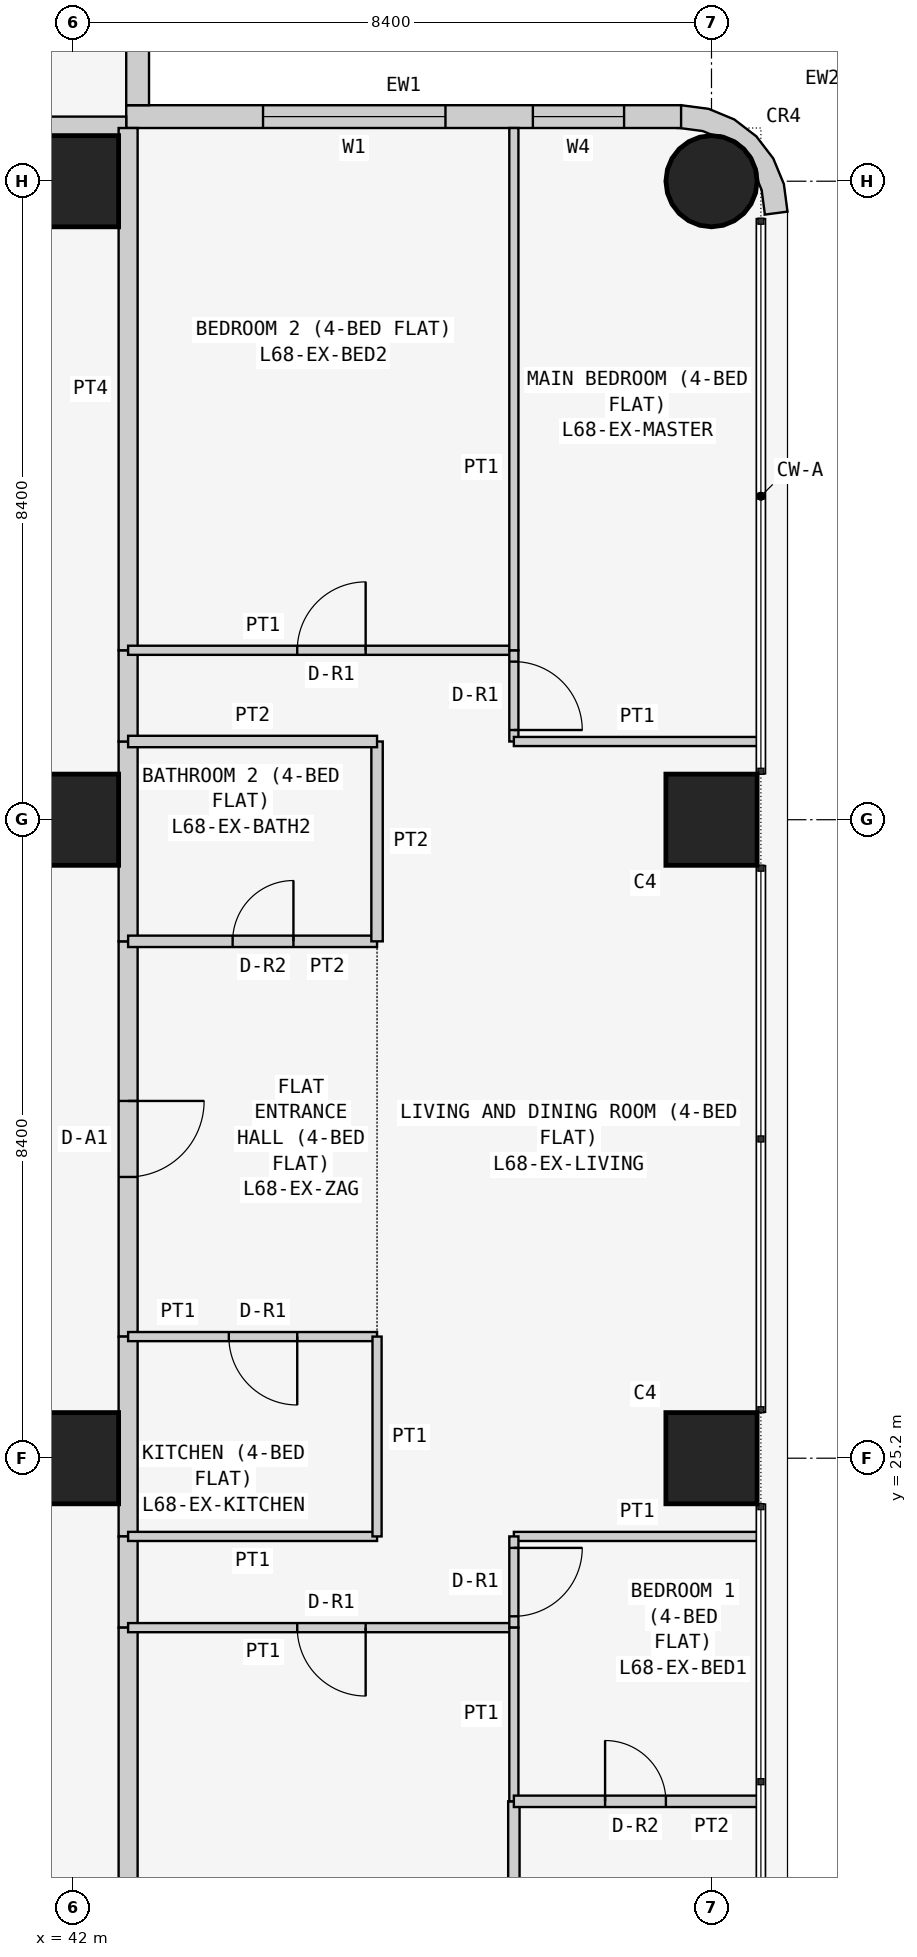
"""IFC4 building model, lengths in metres.
Left out: names, types, materials, properties, quantities, classifications, styles, units other than length and angle.
Written with IfcOpenShell. Run it as: python <this file> out.ifc"""

import sys

from ifc_helpers import new_model, si_unit, direction, frame, frame_2d, origin, origin_2d, place, context, subcontext, project, spatial, polyline, rectangle, circle, outline, extrude, element, fill, save


model = new_model("IFC4")
c1 = context("Model", 3, precision=1e-05, world=origin(), true_north=direction((0.0, 1.0)))
c2 = subcontext(c1, "Body", "Model", "MODEL_VIEW")
j1 = project(units=[si_unit("LENGTHUNIT", "METRE"), si_unit("PLANEANGLEUNIT", "RADIAN")], contexts=[c1])
p1 = place(None, origin())
s1 = spatial("IfcSite", under=j1, at=p1, CompositionType="ELEMENT")
p2 = place(p1, origin())
s2 = spatial("IfcBuilding", under=s1, at=p2, CompositionType="ELEMENT")
p3 = place(p2, frame((0.0, 0.0, 261.3)))
s3 = spatial("IfcBuildingStorey", under=s2, at=p3, CompositionType="ELEMENT", Elevation=261.3)
for number, where, z_axis, x_axis in (
    (1, (42.0, 25.2, 0.0), (0.0, 0.0, 1.0), (1.0, 0.0, 0.0)),
    (2, (42.0, 33.6, 0.0), (0.0, 0.0, 1.0), (1.0, 0.0, 0.0)),
    (3, (42.0, 42.0, 0.0), (0.0, 0.0, 1.0), (1.0, 0.0, 0.0)),
    (4, (50.4, 25.2, 0.0), (0.0, 0.0, 1.0), (1.0, 0.0, 0.0)),
    (5, (50.4, 33.6, 0.0), (0.0, 0.0, 1.0), (1.0, 0.0, 0.0)),
):
    element("IfcColumn", number, at=place(p3, frame(where, z_axis=z_axis, x_axis=x_axis)), inside=s3, PredefinedType="COLUMN", context=c2, shape_type="SweptSolid", body=[
        extrude(rectangle(XDim=1.2, YDim=1.2, at=origin_2d()), origin(), (0.0, 0.0, 1.0), 3.6),
    ])
p4 = place(p3, frame((50.4, 42.0, 0.0), z_axis=(0.0, 0.0, 1.0), x_axis=(1.0, 0.0, 0.0)))
e6 = element("IfcColumn", 6, at=p4, inside=s3, PredefinedType="COLUMN", context=c2, shape_type="SweptSolid", body=[
    extrude(circle(Radius=0.6, at=origin_2d()), origin(), (0.0, 0.0, 1.0), 3.6),
])
p5 = place(p3, frame((50.0, 42.85, 0.0), z_axis=(0.0, 0.0, 1.0), x_axis=(-1.0, 0.0, 0.0)))
e7 = element("IfcWall", 7, at=p5, inside=s3, PredefinedType="SOLIDWALL", context=c2, shape_type="SweptSolid", body=[
    extrude(rectangle(XDim=7.3, YDim=0.3, at=frame_2d((3.65, 0.0))), origin(), (0.0, 0.0, 1.0), 3.45),
])
p6 = place(p5, frame((3.1, 0.0, 0.9)))
e8 = element("IfcOpeningElement", 8, at=p6, cuts=e7, PredefinedType="OPENING", context=c2, shape_type="SweptSolid", body=[
    extrude(rectangle(XDim=2.4, YDim=1.5, at=frame_2d((1.2, 0.75))), frame((0.0, 0.16, 0.0), z_axis=(0.0, -1.0, 0.0), x_axis=(1.0, 0.0, 0.0)), (0.0, 0.0, 1.0), 0.32),
])
p7 = place(p5, frame((0.75, 0.0, 0.9)))
e9 = element("IfcOpeningElement", 9, at=p7, cuts=e7, PredefinedType="OPENING", context=c2, shape_type="SweptSolid", body=[
    extrude(rectangle(XDim=1.2, YDim=1.5, at=frame_2d((0.6, 0.75))), frame((0.0, 0.16, 0.0), z_axis=(0.0, -1.0, 0.0), x_axis=(1.0, 0.0, 0.0)), (0.0, 0.0, 1.0), 0.32),
])
p8 = place(p3, frame((42.85, 43.0, 0.0), z_axis=(0.0, 0.0, 1.0), x_axis=(0.0, 1.0, 0.0)))
e10 = element("IfcWall", 10, at=p8, inside=s3, PredefinedType="SOLIDWALL", context=c2, shape_type="SweptSolid", body=[
    extrude(rectangle(XDim=7.0, YDim=0.3, at=frame_2d((3.5, 0.0))), origin(), (0.0, 0.0, 1.0), 3.45),
])
p9 = place(p8, frame((1.5, 0.0, 0.9)))
e11 = element("IfcOpeningElement", 11, at=p9, cuts=e10, PredefinedType="OPENING", context=c2, shape_type="SweptSolid", body=[
    extrude(rectangle(XDim=2.4, YDim=1.5, at=frame_2d((1.2, 0.75))), frame((0.0, 0.16, 0.0), z_axis=(0.0, -1.0, 0.0), x_axis=(1.0, 0.0, 0.0)), (0.0, 0.0, 1.0), 0.32),
])
p10 = place(p8, frame((5.05, 0.0, 0.9)))
e12 = element("IfcOpeningElement", 12, at=p10, cuts=e10, PredefinedType="OPENING", context=c2, shape_type="SweptSolid", body=[
    extrude(rectangle(XDim=1.2, YDim=1.5, at=frame_2d((0.6, 0.75))), frame((0.0, 0.16, 0.0), z_axis=(0.0, -1.0, 0.0), x_axis=(1.0, 0.0, 0.0)), (0.0, 0.0, 1.0), 0.32),
])
p11 = place(p3, frame((50.976, 41.638, 0.0), z_axis=(0.0, 0.0, 1.0), x_axis=(0.707106781187, 0.707106781187, 0.0)))
e13 = element("IfcWall", 13, at=p11, inside=s3, PredefinedType="SOLIDWALL", context=c2, shape_type="SweptSolid", body=[
    extrude(outline(polyline([(0.233, 0.114), (0.047, -0.129), (0.033, -0.143), (0.273, -0.327), (0.495, -0.037), (0.635, 0.301), (0.683, 0.663), (0.635, 1.025), (0.495, 1.363), (0.273, 1.653), (0.033, 1.469), (0.047, 1.455), (0.233, 1.212), (0.292, 1.069), (0.358, 1.003), (0.449, 0.782), (0.449, 0.543), (0.358, 0.322), (0.292, 0.257), (0.233, 0.114)])), origin(), (0.0, 0.0, 1.0), 3.45),
])
p12 = place(p3, frame((35.829, 42.725, 0.0), z_axis=(0.0, 0.0, 1.0), x_axis=(1.0, 0.0, 0.0)))
e14 = element("IfcWall", 14, at=p12, inside=s3, PredefinedType="PARTITIONING", context=c2, shape_type="SweptSolid", body=[
    extrude(rectangle(XDim=6.871, YDim=0.25, at=frame_2d((3.436, 0.0))), origin(), (0.0, 0.0, 1.0), 3.45),
])
p13 = place(p3, frame((42.725, 32.0, 0.0), z_axis=(0.0, 0.0, 1.0), x_axis=(0.0, -1.0, 0.0)))
e15 = element("IfcWall", 15, at=p13, inside=s3, PredefinedType="PARTITIONING", context=c2, shape_type="SweptSolid", body=[
    extrude(rectangle(XDim=5.2, YDim=0.25, at=frame_2d((2.6, 0.0))), origin(), (0.0, 0.0, 1.0), 3.45),
])
p14 = place(p13, frame((2.1, 0.0, 0.0)))
e16 = element("IfcOpeningElement", 16, at=p14, cuts=e15, PredefinedType="OPENING", context=c2, shape_type="SweptSolid", body=[
    extrude(rectangle(XDim=1.0, YDim=2.1, at=frame_2d((0.5, 1.05))), frame((0.0, 0.135, 0.0), z_axis=(0.0, -1.0, 0.0), x_axis=(1.0, 0.0, 0.0)), (0.0, 0.0, 1.0), 0.27),
])
p15 = place(p3, frame((42.725, 34.629, 0.0), z_axis=(0.0, 0.0, 1.0), x_axis=(0.0, -1.0, 0.0)))
e17 = element("IfcWall", 17, at=p15, inside=s3, PredefinedType="PARTITIONING", context=c2, shape_type="SweptSolid", body=[
    extrude(rectangle(XDim=2.629, YDim=0.25, at=frame_2d((1.314, 0.0))), origin(), (0.0, 0.0, 1.0), 3.45),
])
p16 = place(p3, frame((42.725, 26.8, 0.0), z_axis=(0.0, 0.0, 1.0), x_axis=(0.0, -1.0, 0.0)))
e18 = element("IfcWall", 18, at=p16, inside=s3, PredefinedType="PARTITIONING", context=c2, shape_type="SweptSolid", body=[
    extrude(rectangle(XDim=2.629, YDim=0.25, at=frame_2d((1.314, 0.0))), origin(), (0.0, 0.0, 1.0), 3.45),
])
p17 = place(p3, frame((42.725, 24.171, 0.0), z_axis=(0.0, 0.0, 1.0), x_axis=(0.0, -1.0, 0.0)))
e19 = element("IfcWall", 19, at=p17, inside=s3, PredefinedType="PARTITIONING", context=c2, shape_type="SweptSolid", body=[
    extrude(rectangle(XDim=1.2, YDim=0.25, at=frame_2d((0.6, 0.0))), origin(), (0.0, 0.0, 1.0), 3.45),
])
p18 = place(p3, frame((42.725, 35.829, 0.0), z_axis=(0.0, 0.0, 1.0), x_axis=(0.0, -1.0, 0.0)))
e20 = element("IfcWall", 20, at=p18, inside=s3, PredefinedType="PARTITIONING", context=c2, shape_type="SweptSolid", body=[
    extrude(rectangle(XDim=1.2, YDim=0.25, at=frame_2d((0.6, 0.0))), origin(), (0.0, 0.0, 1.0), 3.45),
])
for number, where, z_axis, x_axis in (
    (21, (42.725, 42.7, 0.0), (0.0, 0.0, 1.0), (0.0, -1.0, 0.0)),
    (22, (42.725, 22.971, 0.0), (0.0, 0.0, 1.0), (0.0, -1.0, 0.0)),
):
    element("IfcWall", number, at=place(p3, frame(where, z_axis=z_axis, x_axis=x_axis)), inside=s3, PredefinedType="PARTITIONING", context=c2, shape_type="SweptSolid", body=[
        extrude(rectangle(XDim=6.871, YDim=0.25, at=frame_2d((3.436, 0.0))), origin(), (0.0, 0.0, 1.0), 3.45),
    ])
p19 = place(p3, frame((46.0, 32.0, 0.0), z_axis=(0.0, 0.0, 1.0), x_axis=(-1.0, 0.0, 0.0)))
e23 = element("IfcWall", 23, at=p19, inside=s3, PredefinedType="PARTITIONING", context=c2, shape_type="SweptSolid", body=[
    extrude(rectangle(XDim=3.275, YDim=0.15, at=frame_2d((1.637, 0.0))), origin(), (0.0, 0.0, 1.0), 3.45),
])
p20 = place(p19, frame((1.1, 0.0, 0.0)))
e24 = element("IfcOpeningElement", 24, at=p20, cuts=e23, PredefinedType="OPENING", context=c2, shape_type="SweptSolid", body=[
    extrude(rectangle(XDim=0.8, YDim=2.1, at=frame_2d((0.4, 1.05))), frame((0.0, 0.085, 0.0), z_axis=(0.0, -1.0, 0.0), x_axis=(1.0, 0.0, 0.0)), (0.0, 0.0, 1.0), 0.17),
])
p21 = place(p3, frame((42.725, 26.8, 0.0), z_axis=(0.0, 0.0, 1.0), x_axis=(1.0, 0.0, 0.0)))
e25 = element("IfcWall", 25, at=p21, inside=s3, PredefinedType="PARTITIONING", context=c2, shape_type="SweptSolid", body=[
    extrude(rectangle(XDim=3.275, YDim=0.12, at=frame_2d((1.637, 0.0))), origin(), (0.0, 0.0, 1.0), 3.45),
])
p22 = place(p21, frame((1.325, 0.0, 0.0)))
e26 = element("IfcOpeningElement", 26, at=p22, cuts=e25, PredefinedType="OPENING", context=c2, shape_type="SweptSolid", body=[
    extrude(rectangle(XDim=0.9, YDim=2.1, at=frame_2d((0.45, 1.05))), frame((0.0, 0.07, 0.0), z_axis=(0.0, -1.0, 0.0), x_axis=(1.0, 0.0, 0.0)), (0.0, 0.0, 1.0), 0.14),
])
p23 = place(p3, frame((46.0, 32.0, 0.0), z_axis=(0.0, 0.0, 1.0), x_axis=(0.0, 1.0, 0.0)))
e27 = element("IfcWall", 27, at=p23, inside=s3, PredefinedType="PARTITIONING", context=c2, shape_type="SweptSolid", body=[
    extrude(rectangle(XDim=2.629, YDim=0.15, at=frame_2d((1.314, 0.0))), origin(), (0.0, 0.0, 1.0), 3.45),
])
p24 = place(p3, frame((46.0, 34.629, 0.0), z_axis=(0.0, 0.0, 1.0), x_axis=(-1.0, 0.0, 0.0)))
e28 = element("IfcWall", 28, at=p24, inside=s3, PredefinedType="PARTITIONING", context=c2, shape_type="SweptSolid", body=[
    extrude(rectangle(XDim=3.275, YDim=0.15, at=frame_2d((1.637, 0.0))), origin(), (0.0, 0.0, 1.0), 3.45),
])
p25 = place(p3, frame((42.725, 24.171, 0.0), z_axis=(0.0, 0.0, 1.0), x_axis=(1.0, 0.0, 0.0)))
e29 = element("IfcWall", 29, at=p25, inside=s3, PredefinedType="PARTITIONING", context=c2, shape_type="SweptSolid", body=[
    extrude(rectangle(XDim=3.275, YDim=0.12, at=frame_2d((1.637, 0.0))), origin(), (0.0, 0.0, 1.0), 3.45),
])
p26 = place(p3, frame((46.0, 24.171, 0.0), z_axis=(0.0, 0.0, 1.0), x_axis=(0.0, 1.0, 0.0)))
e30 = element("IfcWall", 30, at=p26, inside=s3, PredefinedType="PARTITIONING", context=c2, shape_type="SweptSolid", body=[
    extrude(rectangle(XDim=2.629, YDim=0.12, at=frame_2d((1.314, 0.0))), origin(), (0.0, 0.0, 1.0), 3.45),
])
p27 = place(p3, frame((42.725, 35.829, 0.0), z_axis=(0.0, 0.0, 1.0), x_axis=(1.0, 0.0, 0.0)))
e31 = element("IfcWall", 31, at=p27, inside=s3, PredefinedType="PARTITIONING", context=c2, shape_type="SweptSolid", body=[
    extrude(rectangle(XDim=5.075, YDim=0.12, at=frame_2d((2.538, 0.0))), origin(), (0.0, 0.0, 1.0), 3.45),
])
p28 = place(p27, frame((2.225, 0.0, 0.0)))
e32 = element("IfcOpeningElement", 32, at=p28, cuts=e31, PredefinedType="OPENING", context=c2, shape_type="SweptSolid", body=[
    extrude(rectangle(XDim=0.9, YDim=2.1, at=frame_2d((0.45, 1.05))), frame((0.0, 0.07, 0.0), z_axis=(0.0, -1.0, 0.0), x_axis=(1.0, 0.0, 0.0)), (0.0, 0.0, 1.0), 0.14),
])
p29 = place(p3, frame((47.8, 35.829, 0.0), z_axis=(0.0, 0.0, 1.0), x_axis=(0.0, -1.0, 0.0)))
e33 = element("IfcWall", 33, at=p29, inside=s3, PredefinedType="PARTITIONING", context=c2, shape_type="SweptSolid", body=[
    extrude(rectangle(XDim=1.2, YDim=0.12, at=frame_2d((0.6, 0.0))), origin(), (0.0, 0.0, 1.0), 3.45),
])
p30 = place(p29, frame((0.149, 0.0, 0.0)))
e34 = element("IfcOpeningElement", 34, at=p30, cuts=e33, PredefinedType="OPENING", context=c2, shape_type="SweptSolid", body=[
    extrude(rectangle(XDim=0.9, YDim=2.1, at=frame_2d((0.45, 1.05))), frame((0.0, 0.07, 0.0), z_axis=(0.0, -1.0, 0.0), x_axis=(1.0, 0.0, 0.0)), (0.0, 0.0, 1.0), 0.14),
])
p31 = place(p3, frame((47.8, 34.629, 0.0), z_axis=(0.0, 0.0, 1.0), x_axis=(1.0, 0.0, 0.0)))
e35 = element("IfcWall", 35, at=p31, inside=s3, PredefinedType="PARTITIONING", context=c2, shape_type="SweptSolid", body=[
    extrude(rectangle(XDim=3.25, YDim=0.12, at=frame_2d((1.625, 0.0))), origin(), (0.0, 0.0, 1.0), 3.45),
])
p32 = place(p3, frame((47.8, 22.971, 0.0), z_axis=(0.0, 0.0, 1.0), x_axis=(-1.0, 0.0, 0.0)))
e36 = element("IfcWall", 36, at=p32, inside=s3, PredefinedType="PARTITIONING", context=c2, shape_type="SweptSolid", body=[
    extrude(rectangle(XDim=5.075, YDim=0.12, at=frame_2d((2.538, 0.0))), origin(), (0.0, 0.0, 1.0), 3.45),
])
p33 = place(p32, frame((1.95, 0.0, 0.0)))
e37 = element("IfcOpeningElement", 37, at=p33, cuts=e36, PredefinedType="OPENING", context=c2, shape_type="SweptSolid", body=[
    extrude(rectangle(XDim=0.9, YDim=2.1, at=frame_2d((0.45, 1.05))), frame((0.0, 0.07, 0.0), z_axis=(0.0, -1.0, 0.0), x_axis=(1.0, 0.0, 0.0)), (0.0, 0.0, 1.0), 0.14),
])
p34 = place(p3, frame((51.05, 24.171, 0.0), z_axis=(0.0, 0.0, 1.0), x_axis=(-1.0, 0.0, 0.0)))
e38 = element("IfcWall", 38, at=p34, inside=s3, PredefinedType="PARTITIONING", context=c2, shape_type="SweptSolid", body=[
    extrude(rectangle(XDim=3.25, YDim=0.12, at=frame_2d((1.625, 0.0))), origin(), (0.0, 0.0, 1.0), 3.45),
])
p35 = place(p3, frame((47.8, 24.171, 0.0), z_axis=(0.0, 0.0, 1.0), x_axis=(0.0, -1.0, 0.0)))
e39 = element("IfcWall", 39, at=p35, inside=s3, PredefinedType="PARTITIONING", context=c2, shape_type="SweptSolid", body=[
    extrude(rectangle(XDim=1.2, YDim=0.12, at=frame_2d((0.6, 0.0))), origin(), (0.0, 0.0, 1.0), 3.45),
])
p36 = place(p35, frame((0.151, 0.0, 0.0)))
e40 = element("IfcOpeningElement", 40, at=p36, cuts=e39, PredefinedType="OPENING", context=c2, shape_type="SweptSolid", body=[
    extrude(rectangle(XDim=0.9, YDim=2.1, at=frame_2d((0.45, 1.05))), frame((0.0, 0.07, 0.0), z_axis=(0.0, -1.0, 0.0), x_axis=(1.0, 0.0, 0.0)), (0.0, 0.0, 1.0), 0.14),
])
p37 = place(p3, frame((47.8, 35.829, 0.0), z_axis=(0.0, 0.0, 1.0), x_axis=(0.0, 1.0, 0.0)))
e41 = element("IfcWall", 41, at=p37, inside=s3, PredefinedType="PARTITIONING", context=c2, shape_type="SweptSolid", body=[
    extrude(rectangle(XDim=6.871, YDim=0.12, at=frame_2d((3.436, 0.0))), origin(), (0.0, 0.0, 1.0), 3.45),
])
p38 = place(p3, frame((47.8, 16.1, 0.0), z_axis=(0.0, 0.0, 1.0), x_axis=(0.0, 1.0, 0.0)))
e42 = element("IfcWall", 42, at=p38, inside=s3, PredefinedType="PARTITIONING", context=c2, shape_type="SweptSolid", body=[
    extrude(rectangle(XDim=4.586, YDim=0.15, at=frame_2d((2.293, 0.0))), origin(), (0.0, 0.0, 1.0), 3.45),
])
p39 = place(p3, frame((47.8, 20.686, 0.0), z_axis=(0.0, 0.0, 1.0), x_axis=(0.0, 1.0, 0.0)))
e43 = element("IfcWall", 43, at=p39, inside=s3, PredefinedType="PARTITIONING", context=c2, shape_type="SweptSolid", body=[
    extrude(rectangle(XDim=2.285, YDim=0.12, at=frame_2d((1.143, 0.0))), origin(), (0.0, 0.0, 1.0), 3.45),
])
p40 = place(p3, frame((51.05, 20.686, 0.0), z_axis=(0.0, 0.0, 1.0), x_axis=(-1.0, 0.0, 0.0)))
e44 = element("IfcWall", 44, at=p40, inside=s3, PredefinedType="PARTITIONING", context=c2, shape_type="SweptSolid", body=[
    extrude(rectangle(XDim=3.25, YDim=0.15, at=frame_2d((1.625, 0.0))), origin(), (0.0, 0.0, 1.0), 3.45),
])
p41 = place(p40, frame((1.25, 0.0, 0.0)))
e45 = element("IfcOpeningElement", 45, at=p41, cuts=e44, PredefinedType="OPENING", context=c2, shape_type="SweptSolid", body=[
    extrude(rectangle(XDim=0.8, YDim=2.1, at=frame_2d((0.4, 1.05))), frame((0.0, 0.085, 0.0), z_axis=(0.0, -1.0, 0.0), x_axis=(1.0, 0.0, 0.0)), (0.0, 0.0, 1.0), 0.17),
])
p42 = place(p6, origin())
e46 = element("IfcWindow", 46, at=p42, inside=s3, PartitioningType="SINGLE_PANEL", PredefinedType="WINDOW", context=c2, shape_type="SweptSolid", body=[
    extrude(rectangle(XDim=2.4, YDim=1.5, at=frame_2d((1.2, 0.75))), frame((0.0, 0.03, 0.0), z_axis=(0.0, -1.0, 0.0), x_axis=(1.0, 0.0, 0.0)), (0.0, 0.0, 1.0), 0.06),
])
fill(e8, e46)
p43 = place(p7, origin())
e47 = element("IfcWindow", 47, at=p43, inside=s3, PartitioningType="SINGLE_PANEL", PredefinedType="WINDOW", context=c2, shape_type="SweptSolid", body=[
    extrude(rectangle(XDim=1.2, YDim=1.5, at=frame_2d((0.6, 0.75))), frame((0.0, 0.03, 0.0), z_axis=(0.0, -1.0, 0.0), x_axis=(1.0, 0.0, 0.0)), (0.0, 0.0, 1.0), 0.06),
])
fill(e9, e47)
p44 = place(p14, origin())
e48 = element("IfcDoor", 48, at=p44, inside=s3, OperationType="SINGLE_SWING_LEFT", PredefinedType="DOOR", context=c2, shape_type="SweptSolid", body=[
    extrude(rectangle(XDim=1.0, YDim=2.1, at=frame_2d((0.5, 1.05))), frame((0.0, 0.025, 0.0), z_axis=(0.0, -1.0, 0.0), x_axis=(1.0, 0.0, 0.0)), (0.0, 0.0, 1.0), 0.05),
])
fill(e16, e48)
p45 = place(p20, frame((0.8, 0.0, 0.0), z_axis=(0.0, 0.0, 1.0), x_axis=(-1.0, 0.0, 0.0)))
e49 = element("IfcDoor", 49, at=p45, inside=s3, OperationType="SINGLE_SWING_RIGHT", PredefinedType="DOOR", context=c2, shape_type="SweptSolid", body=[
    extrude(rectangle(XDim=0.8, YDim=2.1, at=frame_2d((0.4, 1.05))), frame((0.0, 0.025, 0.0), z_axis=(0.0, -1.0, 0.0), x_axis=(1.0, 0.0, 0.0)), (0.0, 0.0, 1.0), 0.05),
])
fill(e24, e49)
p46 = place(p22, frame((0.9, 0.0, 0.0), z_axis=(0.0, 0.0, 1.0), x_axis=(-1.0, 0.0, 0.0)))
e50 = element("IfcDoor", 50, at=p46, inside=s3, OperationType="SINGLE_SWING_LEFT", PredefinedType="DOOR", context=c2, shape_type="SweptSolid", body=[
    extrude(rectangle(XDim=0.9, YDim=2.1, at=frame_2d((0.45, 1.05))), frame((0.0, 0.025, 0.0), z_axis=(0.0, -1.0, 0.0), x_axis=(1.0, 0.0, 0.0)), (0.0, 0.0, 1.0), 0.05),
])
fill(e26, e50)
p47 = place(p28, origin())
e51 = element("IfcDoor", 51, at=p47, inside=s3, OperationType="SINGLE_SWING_RIGHT", PredefinedType="DOOR", context=c2, shape_type="SweptSolid", body=[
    extrude(rectangle(XDim=0.9, YDim=2.1, at=frame_2d((0.45, 1.05))), frame((0.0, 0.025, 0.0), z_axis=(0.0, -1.0, 0.0), x_axis=(1.0, 0.0, 0.0)), (0.0, 0.0, 1.0), 0.05),
])
fill(e32, e51)
p48 = place(p30, origin())
e52 = element("IfcDoor", 52, at=p48, inside=s3, OperationType="SINGLE_SWING_RIGHT", PredefinedType="DOOR", context=c2, shape_type="SweptSolid", body=[
    extrude(rectangle(XDim=0.9, YDim=2.1, at=frame_2d((0.45, 1.05))), frame((0.0, 0.025, 0.0), z_axis=(0.0, -1.0, 0.0), x_axis=(1.0, 0.0, 0.0)), (0.0, 0.0, 1.0), 0.05),
])
fill(e34, e52)
p49 = place(p33, origin())
e53 = element("IfcDoor", 53, at=p49, inside=s3, OperationType="SINGLE_SWING_LEFT", PredefinedType="DOOR", context=c2, shape_type="SweptSolid", body=[
    extrude(rectangle(XDim=0.9, YDim=2.1, at=frame_2d((0.45, 1.05))), frame((0.0, 0.025, 0.0), z_axis=(0.0, -1.0, 0.0), x_axis=(1.0, 0.0, 0.0)), (0.0, 0.0, 1.0), 0.05),
])
fill(e37, e53)
p50 = place(p36, origin())
e54 = element("IfcDoor", 54, at=p50, inside=s3, OperationType="SINGLE_SWING_LEFT", PredefinedType="DOOR", context=c2, shape_type="SweptSolid", body=[
    extrude(rectangle(XDim=0.9, YDim=2.1, at=frame_2d((0.45, 1.05))), frame((0.0, 0.025, 0.0), z_axis=(0.0, -1.0, 0.0), x_axis=(1.0, 0.0, 0.0)), (0.0, 0.0, 1.0), 0.05),
])
fill(e40, e54)
p51 = place(p41, frame((0.8, 0.0, 0.0), z_axis=(0.0, 0.0, 1.0), x_axis=(-1.0, 0.0, 0.0)))
e55 = element("IfcDoor", 55, at=p51, inside=s3, OperationType="SINGLE_SWING_LEFT", PredefinedType="DOOR", context=c2, shape_type="SweptSolid", body=[
    extrude(rectangle(XDim=0.8, YDim=2.1, at=frame_2d((0.4, 1.05))), frame((0.0, 0.025, 0.0), z_axis=(0.0, -1.0, 0.0), x_axis=(1.0, 0.0, 0.0)), (0.0, 0.0, 1.0), 0.05),
])
fill(e45, e55)
save(model, sys.argv[1])
